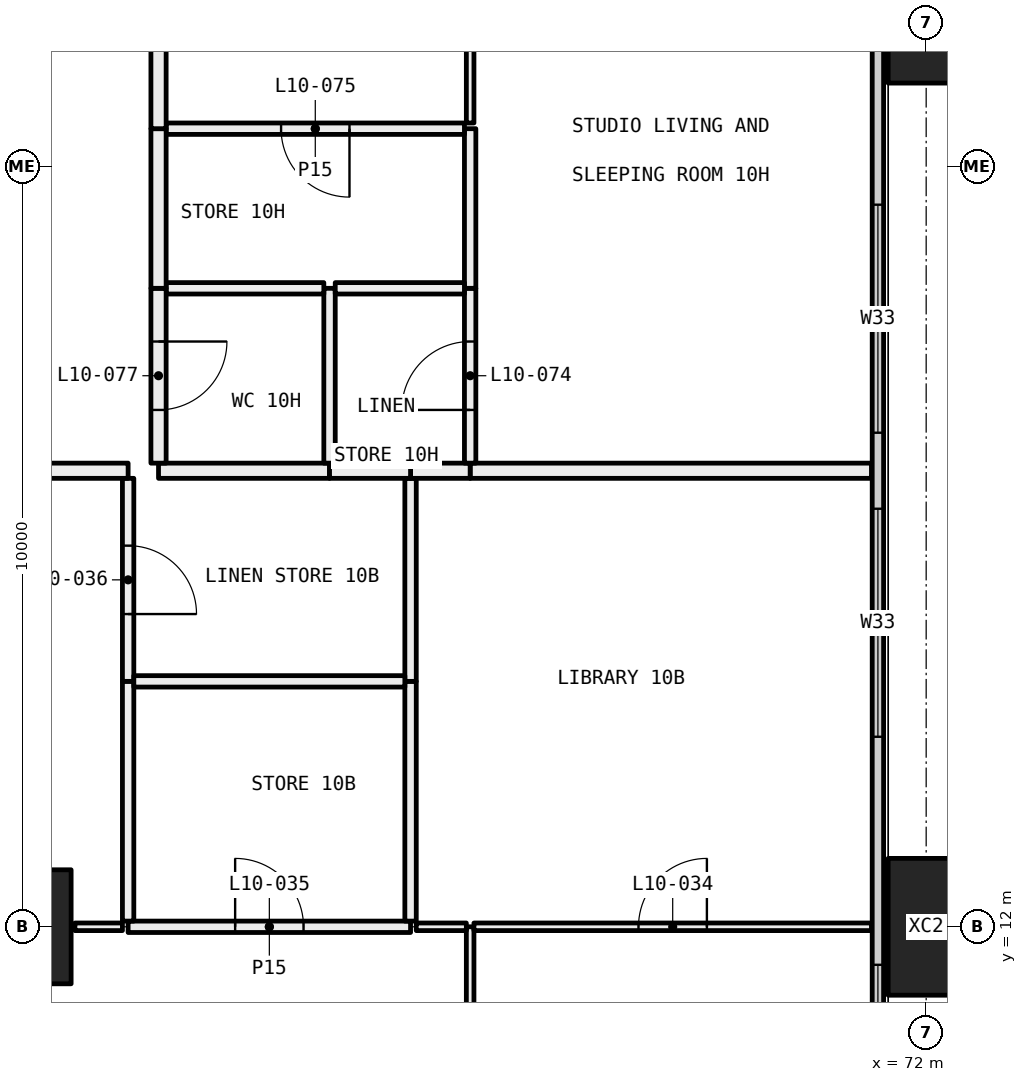
"""IFC4 building model, lengths in metres.
Left out: names, types, materials, properties, quantities, classifications, styles, units other than length and angle.
Written with IfcOpenShell. Run it as: python <this file> out.ifc"""

import sys

from ifc_helpers import new_model, si_unit, direction, frame, frame_2d, origin, origin_2d, place, context, subcontext, project, spatial, rectangle, hollow_rectangle, extrude, element, fill, save


model = new_model("IFC4")
c1 = context("Model", 3, precision=1e-05, world=origin(), true_north=direction((0.0, 1.0)))
c2 = subcontext(c1, "Body", "Model", "MODEL_VIEW")
j1 = project(units=[si_unit("LENGTHUNIT", "METRE"), si_unit("PLANEANGLEUNIT", "RADIAN")], contexts=[c1])
p1 = place(None, origin())
s1 = spatial("IfcSite", under=j1, at=p1, CompositionType="ELEMENT")
p2 = place(p1, origin())
s2 = spatial("IfcBuilding", under=s1, at=p2, CompositionType="ELEMENT")
p3 = place(p2, frame((0.0, 0.0, 47.25)))
s3 = spatial("IfcBuildingStorey", under=s2, at=p3, CompositionType="ELEMENT", Elevation=47.25)
p4 = place(p3, frame((60.0, 12.0, 0.0), z_axis=(0.0, 0.0, 1.0), x_axis=(1.0, 0.0, 0.0)))
e1 = element("IfcColumn", 1, at=p4, inside=s3, PredefinedType="COLUMN", context=c2, shape_type="SweptSolid", body=[
    extrude(hollow_rectangle(XDim=1.5, YDim=1.5, WallThickness=0.065, at=origin_2d()), origin(), (0.0, 0.0, 1.0), 3.05),
])
for number, where, z_axis, x_axis in (
    (2, (72.0, 12.0, -0.4), (0.0, 0.0, 1.0), (0.0, 1.0, 0.0)),
    (3, (72.0, 24.0, -0.4), (0.0, 0.0, 1.0), (0.0, 1.0, 0.0)),
):
    element("IfcColumn", number, at=place(p3, frame(where, z_axis=z_axis, x_axis=x_axis)), inside=s3, PredefinedType="COLUMN", context=c2, shape_type="SweptSolid", body=[
        extrude(hollow_rectangle(XDim=1.8, YDim=1.0, WallThickness=0.07, at=origin_2d()), origin(), (0.0, 0.0, 1.0), 3.45),
    ])
p5 = place(p3, frame((71.365, 6.71, 0.0), z_axis=(0.0, 0.0, 1.0), x_axis=(0.0, 1.0, 0.0)))
e4 = element("IfcWall", 4, at=p5, inside=s3, PredefinedType="ELEMENTEDWALL", context=c2, shape_type="SweptSolid", body=[
    extrude(rectangle(XDim=34.58, YDim=0.15, at=frame_2d((17.29, 0.0))), origin(), (0.0, 0.0, 1.0), 3.05),
])
p6 = place(p5, frame((0.29, 0.0, 0.45)))
e5 = element("IfcOpeningElement", 5, at=p6, cuts=e4, PredefinedType="OPENING", context=c2, shape_type="SweptSolid", body=[
    extrude(rectangle(XDim=4.5, YDim=2.55, at=frame_2d((2.25, 1.275))), frame((0.0, 0.085, 0.0), z_axis=(0.0, -1.0, 0.0), x_axis=(1.0, 0.0, 0.0)), (0.0, 0.0, 1.0), 0.17),
])
p7 = place(p5, frame((7.79, 0.0, 0.45)))
e6 = element("IfcOpeningElement", 6, at=p7, cuts=e4, PredefinedType="OPENING", context=c2, shape_type="SweptSolid", body=[
    extrude(rectangle(XDim=3.0, YDim=2.55, at=frame_2d((1.5, 1.275))), frame((0.0, 0.085, 0.0), z_axis=(0.0, -1.0, 0.0), x_axis=(1.0, 0.0, 0.0)), (0.0, 0.0, 1.0), 0.17),
])
p8 = place(p5, frame((11.79, 0.0, 0.45)))
e7 = element("IfcOpeningElement", 7, at=p8, cuts=e4, PredefinedType="OPENING", context=c2, shape_type="SweptSolid", body=[
    extrude(rectangle(XDim=3.0, YDim=2.55, at=frame_2d((1.5, 1.275))), frame((0.0, 0.085, 0.0), z_axis=(0.0, -1.0, 0.0), x_axis=(1.0, 0.0, 0.0)), (0.0, 0.0, 1.0), 0.17),
])
p9 = place(p5, frame((19.79, 0.0, 0.45)))
e8 = element("IfcOpeningElement", 8, at=p9, cuts=e4, PredefinedType="OPENING", context=c2, shape_type="SweptSolid", body=[
    extrude(rectangle(XDim=3.0, YDim=2.55, at=frame_2d((1.5, 1.275))), frame((0.0, 0.085, 0.0), z_axis=(0.0, -1.0, 0.0), x_axis=(1.0, 0.0, 0.0)), (0.0, 0.0, 1.0), 0.17),
])
p10 = place(p5, frame((23.79, 0.0, 0.45)))
e9 = element("IfcOpeningElement", 9, at=p10, cuts=e4, PredefinedType="OPENING", context=c2, shape_type="SweptSolid", body=[
    extrude(rectangle(XDim=2.0, YDim=2.55, at=frame_2d((1.0, 1.275))), frame((0.0, 0.085, 0.0), z_axis=(0.0, -1.0, 0.0), x_axis=(1.0, 0.0, 0.0)), (0.0, 0.0, 1.0), 0.17),
])
p11 = place(p5, frame((29.79, 0.0, 0.45)))
e10 = element("IfcOpeningElement", 10, at=p11, cuts=e4, PredefinedType="OPENING", context=c2, shape_type="SweptSolid", body=[
    extrude(rectangle(XDim=4.5, YDim=2.55, at=frame_2d((2.25, 1.275))), frame((0.0, 0.085, 0.0), z_axis=(0.0, -1.0, 0.0), x_axis=(1.0, 0.0, 0.0)), (0.0, 0.0, 1.0), 0.17),
])
p12 = place(p3, frame((66.0, 6.72, 0.0), z_axis=(0.0, 0.0, 1.0), x_axis=(0.0, 1.0, 0.0)))
e11 = element("IfcWall", 11, at=p12, inside=s3, PredefinedType="PARTITIONING", context=c2, shape_type="SweptSolid", body=[
    extrude(rectangle(XDim=5.28, YDim=0.1, at=frame_2d((2.64, 0.0))), origin(), (0.0, 0.0, 1.0), 2.45),
])
p13 = place(p12, frame((2.19, 0.0, 0.0)))
e12 = element("IfcOpeningElement", 12, at=p13, cuts=e11, PredefinedType="OPENING", context=c2, shape_type="SweptSolid", body=[
    extrude(rectangle(XDim=0.9, YDim=2.1, at=frame_2d((0.45, 1.05))), frame((0.0, 0.06, 0.0), z_axis=(0.0, -1.0, 0.0), x_axis=(1.0, 0.0, 0.0)), (0.0, 0.0, 1.0), 0.12),
])
p14 = place(p3, frame((61.425, 12.0, 0.0), z_axis=(0.0, 0.0, 1.0), x_axis=(-1.0, 0.0, 0.0)))
e13 = element("IfcWall", 13, at=p14, inside=s3, PredefinedType="PARTITIONING", context=c2, shape_type="SweptSolid", body=[
    extrude(rectangle(XDim=0.625, YDim=0.1, at=frame_2d((0.312, 0.0))), origin(), (0.0, 0.0, 1.0), 2.45),
])
p15 = place(p3, frame((65.95, 12.0, 0.0), z_axis=(0.0, 0.0, 1.0), x_axis=(-1.0, 0.0, 0.0)))
e14 = element("IfcWall", 14, at=p15, inside=s3, PredefinedType="PARTITIONING", context=c2, shape_type="SweptSolid", body=[
    extrude(rectangle(XDim=0.659, YDim=0.1, at=frame_2d((0.33, 0.0))), origin(), (0.0, 0.0, 1.0), 2.45),
])
p16 = place(p3, frame((65.216, 12.0, 0.0), z_axis=(0.0, 0.0, 1.0), x_axis=(-1.0, 0.0, 0.0)))
e15 = element("IfcWall", 15, at=p16, inside=s3, PredefinedType="PARTITIONING", context=c2, shape_type="SweptSolid", body=[
    extrude(rectangle(XDim=3.716, YDim=0.15, at=frame_2d((1.858, 0.0))), origin(), (0.0, 0.0, 1.0), 2.45),
])
p17 = place(p16, frame((1.408, 0.0, 0.0)))
e16 = element("IfcOpeningElement", 16, at=p17, cuts=e15, PredefinedType="OPENING", context=c2, shape_type="SweptSolid", body=[
    extrude(rectangle(XDim=0.9, YDim=2.1, at=frame_2d((0.45, 1.05))), frame((0.0, 0.085, 0.0), z_axis=(0.0, -1.0, 0.0), x_axis=(1.0, 0.0, 0.0)), (0.0, 0.0, 1.0), 0.17),
])
p18 = place(p3, frame((71.28, 12.0, 0.0), z_axis=(0.0, 0.0, 1.0), x_axis=(-1.0, 0.0, 0.0)))
e17 = element("IfcWall", 17, at=p18, inside=s3, PredefinedType="PARTITIONING", context=c2, shape_type="SweptSolid", body=[
    extrude(rectangle(XDim=5.23, YDim=0.1, at=frame_2d((2.615, 0.0))), origin(), (0.0, 0.0, 1.0), 2.45),
])
p19 = place(p18, frame((2.165, 0.0, 0.0)))
e18 = element("IfcOpeningElement", 18, at=p19, cuts=e17, PredefinedType="OPENING", context=c2, shape_type="SweptSolid", body=[
    extrude(rectangle(XDim=0.9, YDim=2.1, at=frame_2d((0.45, 1.05))), frame((0.0, 0.06, 0.0), z_axis=(0.0, -1.0, 0.0), x_axis=(1.0, 0.0, 0.0)), (0.0, 0.0, 1.0), 0.12),
])
p20 = place(p3, frame((61.5, 12.075, 0.0), z_axis=(0.0, 0.0, 1.0), x_axis=(0.0, 1.0, 0.0)))
e19 = element("IfcWall", 19, at=p20, inside=s3, PredefinedType="PARTITIONING", context=c2, shape_type="SweptSolid", body=[
    extrude(rectangle(XDim=3.154, YDim=0.15, at=frame_2d((1.577, 0.0))), origin(), (0.0, 0.0, 1.0), 2.45),
])
p21 = place(p3, frame((61.5, 15.229, 0.0), z_axis=(0.0, 0.0, 1.0), x_axis=(0.0, 1.0, 0.0)))
e20 = element("IfcWall", 20, at=p21, inside=s3, PredefinedType="PARTITIONING", context=c2, shape_type="SweptSolid", body=[
    extrude(rectangle(XDim=2.671, YDim=0.15, at=frame_2d((1.335, 0.0))), origin(), (0.0, 0.0, 1.0), 3.05),
])
p22 = place(p21, frame((0.885, 0.0, 0.0)))
e21 = element("IfcOpeningElement", 21, at=p22, cuts=e20, PredefinedType="OPENING", context=c2, shape_type="SweptSolid", body=[
    extrude(rectangle(XDim=0.9, YDim=2.1, at=frame_2d((0.45, 1.05))), frame((0.0, 0.085, 0.0), z_axis=(0.0, -1.0, 0.0), x_axis=(1.0, 0.0, 0.0)), (0.0, 0.0, 1.0), 0.17),
])
p23 = place(p3, frame((61.5, 18.0, 0.0), z_axis=(0.0, 0.0, 1.0), x_axis=(-1.0, 0.0, 0.0)))
e22 = element("IfcWall", 22, at=p23, inside=s3, PredefinedType="PARTITIONING", context=c2, shape_type="SweptSolid", body=[
    extrude(rectangle(XDim=9.0, YDim=0.2, at=frame_2d((4.5, 0.0))), origin(), (0.0, 0.0, 1.0), 3.05),
])
p24 = place(p3, frame((65.216, 15.229, 0.0), z_axis=(0.0, 0.0, 1.0), x_axis=(0.0, -1.0, 0.0)))
e23 = element("IfcWall", 23, at=p24, inside=s3, PredefinedType="PARTITIONING", context=c2, shape_type="SweptSolid", body=[
    extrude(rectangle(XDim=3.154, YDim=0.15, at=frame_2d((1.577, 0.0))), origin(), (0.0, 0.0, 1.0), 2.45),
])
p25 = place(p3, frame((65.216, 17.9, 0.0), z_axis=(0.0, 0.0, 1.0), x_axis=(0.0, -1.0, 0.0)))
e24 = element("IfcWall", 24, at=p25, inside=s3, PredefinedType="PARTITIONING", context=c2, shape_type="SweptSolid", body=[
    extrude(rectangle(XDim=2.671, YDim=0.15, at=frame_2d((1.335, 0.0))), origin(), (0.0, 0.0, 1.0), 3.05),
])
p26 = place(p3, frame((71.28, 18.0, 0.0), z_axis=(0.0, 0.0, 1.0), x_axis=(-1.0, 0.0, 0.0)))
e25 = element("IfcWall", 25, at=p26, inside=s3, PredefinedType="PARTITIONING", context=c2, shape_type="SweptSolid", body=[
    extrude(rectangle(XDim=5.28, YDim=0.2, at=frame_2d((2.64, 0.0))), origin(), (0.0, 0.0, 1.0), 3.05),
])
p27 = place(p3, frame((66.0, 18.0, 0.0), z_axis=(0.0, 0.0, 1.0), x_axis=(-1.0, 0.0, 0.0)))
e26 = element("IfcWall", 26, at=p27, inside=s3, PredefinedType="PARTITIONING", context=c2, shape_type="SweptSolid", body=[
    extrude(rectangle(XDim=0.784, YDim=0.2, at=frame_2d((0.392, 0.0))), origin(), (0.0, 0.0, 1.0), 3.05),
])
p28 = place(p3, frame((65.141, 15.229, 0.0), z_axis=(0.0, 0.0, 1.0), x_axis=(-1.0, 0.0, 0.0)))
e27 = element("IfcWall", 27, at=p28, inside=s3, PredefinedType="PARTITIONING", context=c2, shape_type="SweptSolid", body=[
    extrude(rectangle(XDim=3.566, YDim=0.15, at=frame_2d((1.783, 0.0))), origin(), (0.0, 0.0, 1.0), 3.05),
])
p29 = place(p3, frame((64.15, 18.0, 0.0), z_axis=(0.0, 0.0, 1.0), x_axis=(-1.0, 0.0, 0.0)))
e28 = element("IfcWall", 28, at=p29, inside=s3, PredefinedType="PARTITIONING", context=c2, shape_type="SweptSolid", body=[
    extrude(rectangle(XDim=2.25, YDim=0.2, at=frame_2d((1.125, 0.0))), origin(), (0.0, 0.0, 1.0), 3.05),
])
p30 = place(p3, frame((65.216, 18.0, 0.0), z_axis=(0.0, 0.0, 1.0), x_axis=(-1.0, 0.0, 0.0)))
e29 = element("IfcWall", 29, at=p30, inside=s3, PredefinedType="PARTITIONING", context=c2, shape_type="SweptSolid", body=[
    extrude(rectangle(XDim=1.066, YDim=0.2, at=frame_2d((0.533, 0.0))), origin(), (0.0, 0.0, 1.0), 3.05),
])
p31 = place(p3, frame((66.0, 20.4, 0.0), z_axis=(0.0, 0.0, 1.0), x_axis=(0.0, -1.0, 0.0)))
e30 = element("IfcWall", 30, at=p31, inside=s3, PredefinedType="PARTITIONING", context=c2, shape_type="SweptSolid", body=[
    extrude(rectangle(XDim=2.3, YDim=0.15, at=frame_2d((1.15, 0.0))), origin(), (0.0, 0.0, 1.0), 3.05),
])
p32 = place(p31, frame((0.7, 0.0, 0.0)))
e31 = element("IfcOpeningElement", 31, at=p32, cuts=e30, PredefinedType="OPENING", context=c2, shape_type="SweptSolid", body=[
    extrude(rectangle(XDim=0.9, YDim=2.1, at=frame_2d((0.45, 1.05))), frame((0.0, 0.085, 0.0), z_axis=(0.0, -1.0, 0.0), x_axis=(1.0, 0.0, 0.0)), (0.0, 0.0, 1.0), 0.17),
])
p33 = place(p3, frame((66.0, 22.5, 0.0), z_axis=(0.0, 0.0, 1.0), x_axis=(0.0, -1.0, 0.0)))
e32 = element("IfcWall", 32, at=p33, inside=s3, PredefinedType="PARTITIONING", context=c2, shape_type="SweptSolid", body=[
    extrude(rectangle(XDim=2.1, YDim=0.15, at=frame_2d((1.05, 0.0))), origin(), (0.0, 0.0, 1.0), 3.05),
])
p34 = place(p3, frame((66.0, 23.9, 0.0), z_axis=(0.0, 0.0, 1.0), x_axis=(0.0, -1.0, 0.0)))
e33 = element("IfcWall", 33, at=p34, inside=s3, PredefinedType="PARTITIONING", context=c2, shape_type="SweptSolid", body=[
    extrude(rectangle(XDim=1.325, YDim=0.1, at=frame_2d((0.663, 0.0))), origin(), (0.0, 0.0, 1.0), 3.05),
])
p35 = place(p3, frame((64.15, 18.1, 0.0), z_axis=(0.0, 0.0, 1.0), x_axis=(0.0, 1.0, 0.0)))
e34 = element("IfcWall", 34, at=p35, inside=s3, PredefinedType="PARTITIONING", context=c2, shape_type="SweptSolid", body=[
    extrude(rectangle(XDim=2.3, YDim=0.15, at=frame_2d((1.15, 0.0))), origin(), (0.0, 0.0, 1.0), 3.05),
])
p36 = place(p3, frame((64.075, 20.4, 0.0), z_axis=(0.0, 0.0, 1.0), x_axis=(-1.0, 0.0, 0.0)))
e35 = element("IfcWall", 35, at=p36, inside=s3, PredefinedType="PARTITIONING", context=c2, shape_type="SweptSolid", body=[
    extrude(rectangle(XDim=2.075, YDim=0.15, at=frame_2d((1.038, 0.0))), origin(), (0.0, 0.0, 1.0), 3.05),
])
p37 = place(p3, frame((61.9, 20.4, 0.0), z_axis=(0.0, 0.0, 1.0), x_axis=(0.0, -1.0, 0.0)))
e36 = element("IfcWall", 36, at=p37, inside=s3, PredefinedType="PARTITIONING", context=c2, shape_type="SweptSolid", body=[
    extrude(rectangle(XDim=2.3, YDim=0.2, at=frame_2d((1.15, 0.0))), origin(), (0.0, 0.0, 1.0), 3.05),
])
p38 = place(p37, frame((0.7, 0.0, 0.0)))
e37 = element("IfcOpeningElement", 37, at=p38, cuts=e36, PredefinedType="OPENING", context=c2, shape_type="SweptSolid", body=[
    extrude(rectangle(XDim=0.9, YDim=2.1, at=frame_2d((0.45, 1.05))), frame((0.0, 0.11, 0.0), z_axis=(0.0, -1.0, 0.0), x_axis=(1.0, 0.0, 0.0)), (0.0, 0.0, 1.0), 0.22),
])
p39 = place(p3, frame((65.925, 20.4, 0.0), z_axis=(0.0, 0.0, 1.0), x_axis=(-1.0, 0.0, 0.0)))
e38 = element("IfcWall", 38, at=p39, inside=s3, PredefinedType="PARTITIONING", context=c2, shape_type="SweptSolid", body=[
    extrude(rectangle(XDim=1.7, YDim=0.15, at=frame_2d((0.85, 0.0))), origin(), (0.0, 0.0, 1.0), 3.05),
])
p40 = place(p3, frame((65.925, 22.5, 0.0), z_axis=(0.0, 0.0, 1.0), x_axis=(-1.0, 0.0, 0.0)))
e39 = element("IfcWall", 39, at=p40, inside=s3, PredefinedType="PARTITIONING", context=c2, shape_type="SweptSolid", body=[
    extrude(rectangle(XDim=3.925, YDim=0.15, at=frame_2d((1.962, 0.0))), origin(), (0.0, 0.0, 1.0), 3.05),
])
p41 = place(p40, frame((1.512, 0.0, 0.0)))
e40 = element("IfcOpeningElement", 40, at=p41, cuts=e39, PredefinedType="OPENING", context=c2, shape_type="SweptSolid", body=[
    extrude(rectangle(XDim=0.9, YDim=2.1, at=frame_2d((0.45, 1.05))), frame((0.0, 0.085, 0.0), z_axis=(0.0, -1.0, 0.0), x_axis=(1.0, 0.0, 0.0)), (0.0, 0.0, 1.0), 0.17),
])
p42 = place(p3, frame((61.9, 22.5, 0.0), z_axis=(0.0, 0.0, 1.0), x_axis=(0.0, -1.0, 0.0)))
e41 = element("IfcWall", 41, at=p42, inside=s3, PredefinedType="PARTITIONING", context=c2, shape_type="SweptSolid", body=[
    extrude(rectangle(XDim=2.1, YDim=0.2, at=frame_2d((1.05, 0.0))), origin(), (0.0, 0.0, 1.0), 3.05),
])
p43 = place(p3, frame((61.9, 23.9, 0.0), z_axis=(0.0, 0.0, 1.0), x_axis=(0.0, -1.0, 0.0)))
e42 = element("IfcWall", 42, at=p43, inside=s3, PredefinedType="PARTITIONING", context=c2, shape_type="SweptSolid", body=[
    extrude(rectangle(XDim=1.4, YDim=0.2, at=frame_2d((0.7, 0.0))), origin(), (0.0, 0.0, 1.0), 3.05),
])
p44 = place(p6, origin())
e43 = element("IfcWindow", 43, at=p44, inside=s3, PartitioningType="SINGLE_PANEL", PredefinedType="WINDOW", context=c2, shape_type="SweptSolid", body=[
    extrude(rectangle(XDim=4.5, YDim=2.55, at=frame_2d((2.25, 1.275))), frame((0.0, 0.03, 0.0), z_axis=(0.0, -1.0, 0.0), x_axis=(1.0, 0.0, 0.0)), (0.0, 0.0, 1.0), 0.06),
])
fill(e5, e43)
p45 = place(p7, origin())
e44 = element("IfcWindow", 44, at=p45, inside=s3, PartitioningType="SINGLE_PANEL", PredefinedType="WINDOW", context=c2, shape_type="SweptSolid", body=[
    extrude(rectangle(XDim=3.0, YDim=2.55, at=frame_2d((1.5, 1.275))), frame((0.0, 0.03, 0.0), z_axis=(0.0, -1.0, 0.0), x_axis=(1.0, 0.0, 0.0)), (0.0, 0.0, 1.0), 0.06),
])
fill(e6, e44)
p46 = place(p8, origin())
e45 = element("IfcWindow", 45, at=p46, inside=s3, PartitioningType="SINGLE_PANEL", PredefinedType="WINDOW", context=c2, shape_type="SweptSolid", body=[
    extrude(rectangle(XDim=3.0, YDim=2.55, at=frame_2d((1.5, 1.275))), frame((0.0, 0.03, 0.0), z_axis=(0.0, -1.0, 0.0), x_axis=(1.0, 0.0, 0.0)), (0.0, 0.0, 1.0), 0.06),
])
fill(e7, e45)
p47 = place(p19, frame((0.9, 0.0, 0.0), x_axis=(-1.0, 0.0, 0.0)))
e46 = element("IfcDoor", 46, at=p47, inside=s3, OperationType="SINGLE_SWING_LEFT", PredefinedType="DOOR", context=c2, shape_type="SweptSolid", body=[
    extrude(rectangle(XDim=0.9, YDim=2.1, at=frame_2d((0.45, 1.05))), frame((0.0, 0.025, 0.0), z_axis=(0.0, -1.0, 0.0), x_axis=(1.0, 0.0, 0.0)), (0.0, 0.0, 1.0), 0.05),
])
fill(e18, e46)
p48 = place(p17, frame((0.9, 0.0, 0.0), x_axis=(-1.0, 0.0, 0.0)))
e47 = element("IfcDoor", 47, at=p48, inside=s3, OperationType="SINGLE_SWING_RIGHT", PredefinedType="DOOR", context=c2, shape_type="SweptSolid", body=[
    extrude(rectangle(XDim=0.9, YDim=2.1, at=frame_2d((0.45, 1.05))), frame((0.0, 0.025, 0.0), z_axis=(0.0, -1.0, 0.0), x_axis=(1.0, 0.0, 0.0)), (0.0, 0.0, 1.0), 0.05),
])
fill(e16, e47)
p49 = place(p22, frame((0.9, 0.0, 0.0), x_axis=(-1.0, 0.0, 0.0)))
e48 = element("IfcDoor", 48, at=p49, inside=s3, OperationType="SINGLE_SWING_LEFT", PredefinedType="DOOR", context=c2, shape_type="SweptSolid", body=[
    extrude(rectangle(XDim=0.9, YDim=2.1, at=frame_2d((0.45, 1.05))), frame((0.0, 0.025, 0.0), z_axis=(0.0, -1.0, 0.0), x_axis=(1.0, 0.0, 0.0)), (0.0, 0.0, 1.0), 0.05),
])
fill(e21, e48)
p50 = place(p32, frame((0.9, 0.0, 0.0), x_axis=(-1.0, 0.0, 0.0)))
e49 = element("IfcDoor", 49, at=p50, inside=s3, OperationType="SINGLE_SWING_RIGHT", PredefinedType="DOOR", context=c2, shape_type="SweptSolid", body=[
    extrude(rectangle(XDim=0.9, YDim=2.1, at=frame_2d((0.45, 1.05))), frame((0.0, 0.025, 0.0), z_axis=(0.0, -1.0, 0.0), x_axis=(1.0, 0.0, 0.0)), (0.0, 0.0, 1.0), 0.05),
])
fill(e31, e49)
p51 = place(p41, origin())
e50 = element("IfcDoor", 50, at=p51, inside=s3, OperationType="SINGLE_SWING_RIGHT", PredefinedType="DOOR", context=c2, shape_type="SweptSolid", body=[
    extrude(rectangle(XDim=0.9, YDim=2.1, at=frame_2d((0.45, 1.05))), frame((0.0, 0.025, 0.0), z_axis=(0.0, -1.0, 0.0), x_axis=(1.0, 0.0, 0.0)), (0.0, 0.0, 1.0), 0.05),
])
fill(e40, e50)
p52 = place(p38, origin())
e51 = element("IfcDoor", 51, at=p52, inside=s3, OperationType="SINGLE_SWING_RIGHT", PredefinedType="DOOR", context=c2, shape_type="SweptSolid", body=[
    extrude(rectangle(XDim=0.9, YDim=2.1, at=frame_2d((0.45, 1.05))), frame((0.0, 0.025, 0.0), z_axis=(0.0, -1.0, 0.0), x_axis=(1.0, 0.0, 0.0)), (0.0, 0.0, 1.0), 0.05),
])
fill(e37, e51)
save(model, sys.argv[1])
